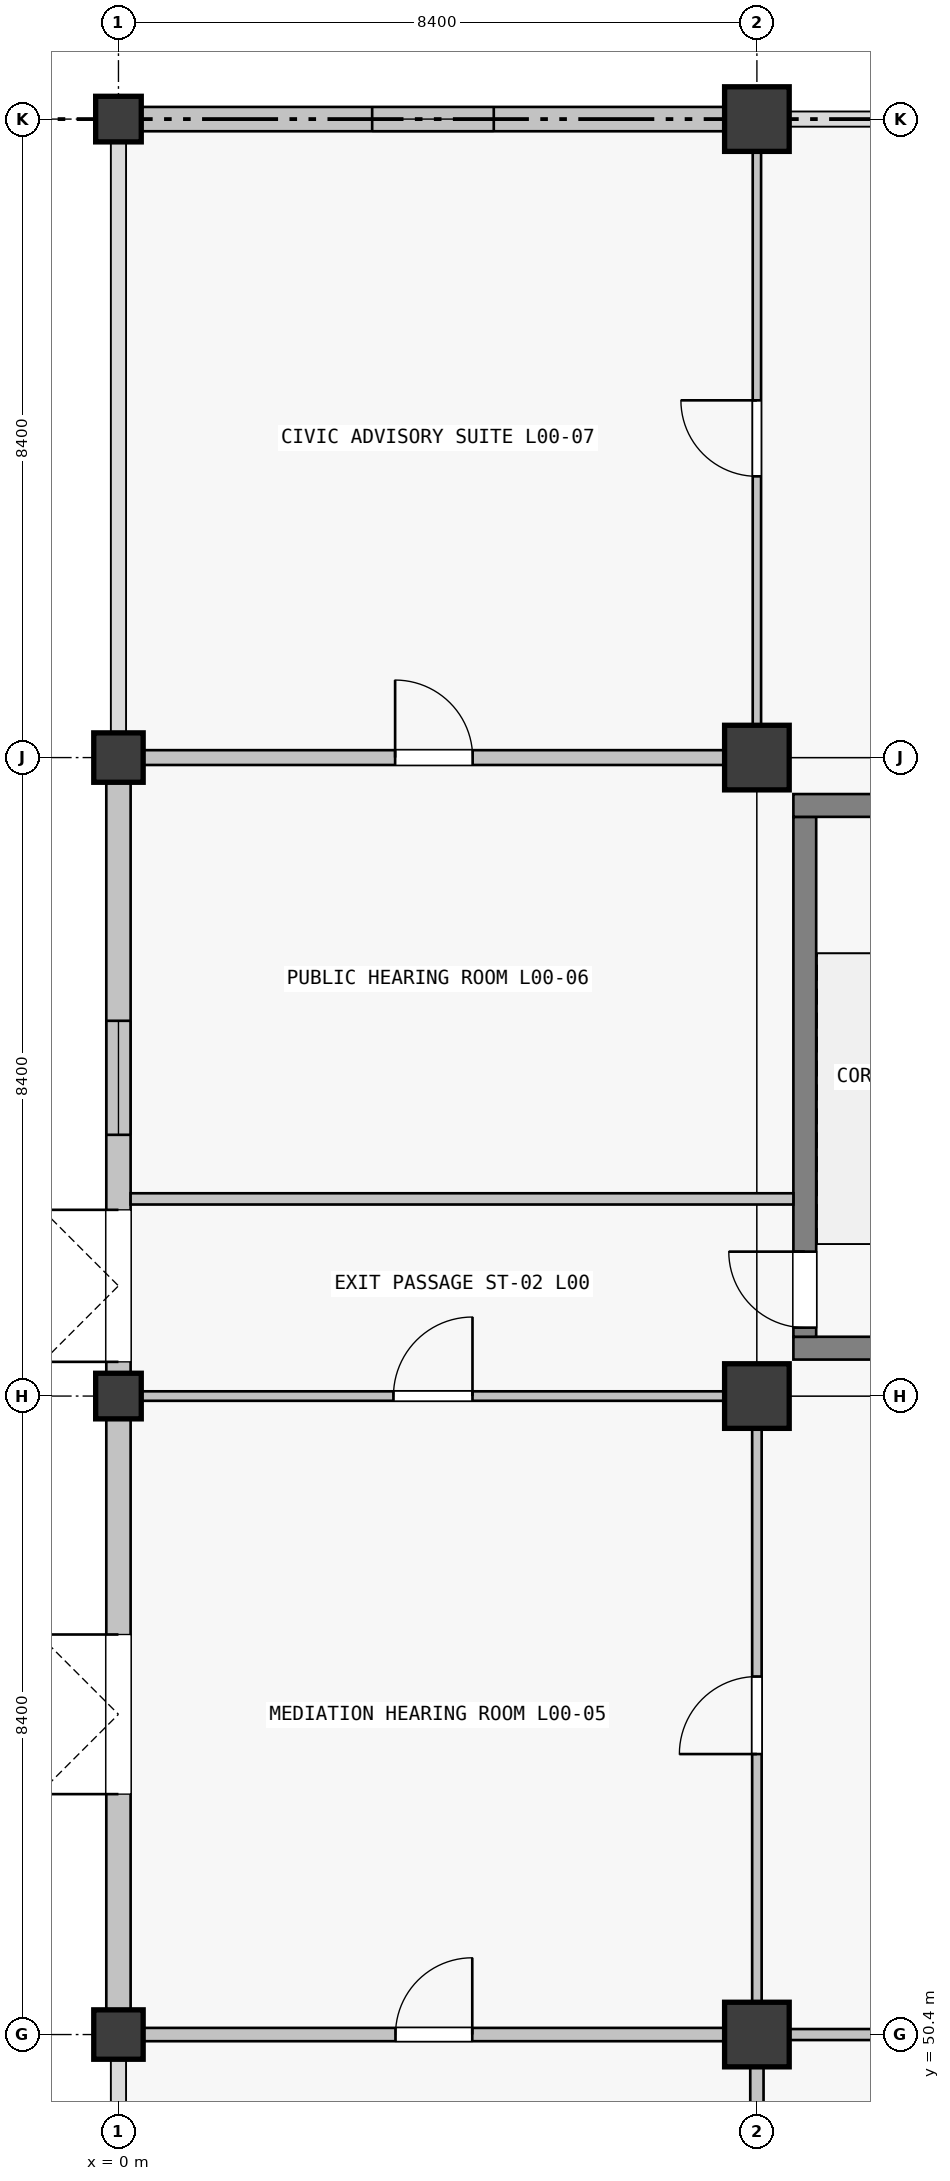
"""IFC4 building model, lengths in metres.
Left out: names, types, materials, properties, quantities, classifications, styles, units other than length and angle.
Written with IfcOpenShell. Run it as: python <this file> out.ifc"""

import sys

from ifc_helpers import new_model, si_unit, direction, frame, frame_2d, origin, origin_2d, place, context, subcontext, project, spatial, rectangle, extrude, element, fill, save


model = new_model("IFC4")
c1 = context("Model", 3, precision=1e-05, world=origin(), true_north=direction((0.0, 1.0)))
c2 = subcontext(c1, "Body", "Model", "MODEL_VIEW")
j1 = project(units=[si_unit("LENGTHUNIT", "METRE"), si_unit("PLANEANGLEUNIT", "RADIAN")], contexts=[c1])
p1 = place(None, origin())
s1 = spatial("IfcSite", under=j1, at=p1, CompositionType="ELEMENT")
p2 = place(p1, origin())
s2 = spatial("IfcBuilding", under=s1, at=p2, CompositionType="ELEMENT")
p3 = place(p2, origin())
s3 = spatial("IfcBuildingStorey", under=s2, at=p3, CompositionType="ELEMENT", Elevation=0.0)
p4 = place(p3, frame((0.0, 50.4, 0.0), z_axis=(0.0, 0.0, 1.0), x_axis=(1.0, 0.0, 0.0)))
e1 = element("IfcColumn", 1, at=p4, inside=s3, PredefinedType="COLUMN", context=c2, shape_type="SweptSolid", body=[
    extrude(rectangle(XDim=0.65, YDim=0.65, at=origin_2d()), origin(), (0.0, 0.0, 1.0), 5.76),
])
p5 = place(p3, frame((0.0, 58.8, 0.0), z_axis=(0.0, 0.0, 1.0), x_axis=(1.0, 0.0, 0.0)))
e2 = element("IfcColumn", 2, at=p5, inside=s3, PredefinedType="COLUMN", context=c2, shape_type="SweptSolid", body=[
    extrude(rectangle(XDim=0.6, YDim=0.6, at=origin_2d()), origin(), (0.0, 0.0, 1.0), 5.76),
])
p6 = place(p3, frame((0.0, 67.2, 0.0), z_axis=(0.0, 0.0, 1.0), x_axis=(1.0, 0.0, 0.0)))
e3 = element("IfcColumn", 3, at=p6, inside=s3, PredefinedType="COLUMN", context=c2, shape_type="SweptSolid", body=[
    extrude(rectangle(XDim=0.65, YDim=0.65, at=origin_2d()), origin(), (0.0, 0.0, 1.0), 5.76),
])
p7 = place(p3, frame((0.0, 75.6, 0.0), z_axis=(0.0, 0.0, 1.0), x_axis=(1.0, 0.0, 0.0)))
e4 = element("IfcColumn", 4, at=p7, inside=s3, PredefinedType="COLUMN", context=c2, shape_type="SweptSolid", body=[
    extrude(rectangle(XDim=0.6, YDim=0.6, at=origin_2d()), origin(), (0.0, 0.0, 1.0), 5.76),
])
for number, where, z_axis, x_axis in (
    (5, (8.4, 50.4, 0.0), (0.0, 0.0, 1.0), (1.0, 0.0, 0.0)),
    (6, (8.4, 58.8, 0.0), (0.0, 0.0, 1.0), (1.0, 0.0, 0.0)),
    (7, (8.4, 67.2, 0.0), (0.0, 0.0, 1.0), (1.0, 0.0, 0.0)),
    (8, (8.4, 75.6, 0.0), (0.0, 0.0, 1.0), (1.0, 0.0, 0.0)),
):
    element("IfcColumn", number, at=place(p3, frame(where, z_axis=z_axis, x_axis=x_axis)), inside=s3, PredefinedType="COLUMN", context=c2, shape_type="SweptSolid", body=[
        extrude(rectangle(XDim=0.85, YDim=0.85, at=origin_2d()), origin(), (0.0, 0.0, 1.0), 5.76),
    ])
p8 = place(p3, frame((0.0, 50.726, 0.0), z_axis=(0.0, 0.0, 1.0), x_axis=(0.0, 1.0, 0.0)))
e9 = element("IfcWall", 9, at=p8, inside=s3, PredefinedType="SOLIDWALL", context=c2, shape_type="SweptSolid", body=[
    extrude(rectangle(XDim=7.773, YDim=0.32, at=frame_2d((3.886, 0.0))), origin(), (0.0, 0.0, 1.0), 4.7),
])
p9 = place(p8, frame((2.837, 0.0, 0.0)))
e10 = element("IfcOpeningElement", 10, at=p9, cuts=e9, PredefinedType="OPENING", context=c2, shape_type="SweptSolid", body=[
    extrude(rectangle(XDim=2.1, YDim=2.25, at=frame_2d((1.05, 1.125))), frame((0.0, 0.16, 0.0), z_axis=(0.0, -1.0, 0.0), x_axis=(1.0, 0.0, 0.0)), (0.0, 0.0, 1.0), 0.32),
])
p10 = place(p3, frame((0.0, 59.101, 0.0), z_axis=(0.0, 0.0, 1.0), x_axis=(0.0, 1.0, 0.0)))
e11 = element("IfcWall", 11, at=p10, inside=s3, PredefinedType="SOLIDWALL", context=c2, shape_type="SweptSolid", body=[
    extrude(rectangle(XDim=7.773, YDim=0.32, at=frame_2d((3.886, 0.0))), origin(), (0.0, 0.0, 1.0), 4.7),
])
p11 = place(p10, frame((3.136, 0.0, 0.9)))
e12 = element("IfcOpeningElement", 12, at=p11, cuts=e11, PredefinedType="OPENING", context=c2, shape_type="SweptSolid", body=[
    extrude(rectangle(XDim=1.5, YDim=1.8, at=frame_2d((0.75, 0.9))), frame((0.0, 0.16, 0.0), z_axis=(0.0, -1.0, 0.0), x_axis=(1.0, 0.0, 0.0)), (0.0, 0.0, 1.0), 0.32),
])
p12 = place(p10, frame((0.149, 0.0, 0.0)))
e13 = element("IfcOpeningElement", 13, at=p12, cuts=e11, PredefinedType="OPENING", context=c2, shape_type="SweptSolid", body=[
    extrude(rectangle(XDim=2.0, YDim=2.25, at=frame_2d((1.0, 1.125))), frame((0.0, 0.16, 0.0), z_axis=(0.0, -1.0, 0.0), x_axis=(1.0, 0.0, 0.0)), (0.0, 0.0, 1.0), 0.32),
])
p13 = place(p3, frame((0.301, 75.6, 0.0), z_axis=(0.0, 0.0, 1.0), x_axis=(1.0, 0.0, 0.0)))
e14 = element("IfcWall", 14, at=p13, inside=s3, PredefinedType="SOLIDWALL", context=c2, shape_type="SweptSolid", body=[
    extrude(rectangle(XDim=7.673, YDim=0.32, at=frame_2d((3.836, 0.0))), origin(), (0.0, 0.0, 1.0), 4.7),
])
p14 = place(p13, frame((3.037, 0.0, 0.9)))
e15 = element("IfcOpeningElement", 15, at=p14, cuts=e14, PredefinedType="OPENING", context=c2, shape_type="SweptSolid", body=[
    extrude(rectangle(XDim=1.6, YDim=2.1, at=frame_2d((0.8, 1.05))), frame((0.0, 0.16, 0.0), z_axis=(0.0, -1.0, 0.0), x_axis=(1.0, 0.0, 0.0)), (0.0, 0.0, 1.0), 0.32),
])
p15 = place(p3, frame((16.32, 59.43, 0.0), z_axis=(0.0, 0.0, 1.0), x_axis=(-1.0, 0.0, 0.0)))
e16 = element("IfcWall", 16, at=p15, inside=s3, PredefinedType="SHEAR", context=c2, shape_type="SweptSolid", body=[
    extrude(rectangle(XDim=7.44, YDim=0.3, at=frame_2d((3.72, 0.0))), origin(), (0.0, 0.0, 1.0), 5.76),
])
p16 = place(p15, frame((1.28, 0.0, 0.0)))
e17 = element("IfcOpeningElement", 17, at=p16, cuts=e16, PredefinedType="OPENING", context=c2, shape_type="SweptSolid", body=[
    extrude(rectangle(XDim=1.5, YDim=2.15, at=frame_2d((0.75, 1.075))), frame((0.0, 0.15, 0.0), z_axis=(0.0, -1.0, 0.0), x_axis=(1.0, 0.0, 0.0)), (0.0, 0.0, 1.0), 0.3),
])
p17 = place(p3, frame((9.03, 59.58, 0.0), z_axis=(0.0, 0.0, 1.0), x_axis=(0.0, 1.0, 0.0)))
e18 = element("IfcWall", 18, at=p17, inside=s3, PredefinedType="SHEAR", context=c2, shape_type="SweptSolid", body=[
    extrude(rectangle(XDim=6.84, YDim=0.3, at=frame_2d((3.42, 0.0))), origin(), (0.0, 0.0, 1.0), 5.76),
])
p18 = place(p17, frame((0.12, 0.0, 0.0)))
e19 = element("IfcOpeningElement", 19, at=p18, cuts=e18, PredefinedType="OPENING", context=c2, shape_type="SweptSolid", body=[
    extrude(rectangle(XDim=1.0, YDim=2.15, at=frame_2d((0.5, 1.075))), frame((0.0, 0.15, 0.0), z_axis=(0.0, -1.0, 0.0), x_axis=(1.0, 0.0, 0.0)), (0.0, 0.0, 1.0), 0.3),
])
p19 = place(p3, frame((8.88, 66.57, 0.0), z_axis=(0.0, 0.0, 1.0), x_axis=(1.0, 0.0, 0.0)))
e20 = element("IfcWall", 20, at=p19, inside=s3, PredefinedType="SHEAR", context=c2, shape_type="SweptSolid", body=[
    extrude(rectangle(XDim=7.44, YDim=0.3, at=frame_2d((3.72, 0.0))), origin(), (0.0, 0.0, 1.0), 5.76),
])
p20 = place(p3, frame((0.327, 50.4, 0.0), z_axis=(0.0, 0.0, 1.0), x_axis=(1.0, 0.0, 0.0)))
e21 = element("IfcWall", 21, at=p20, inside=s3, PredefinedType="PARTITIONING", context=c2, shape_type="SweptSolid", body=[
    extrude(rectangle(XDim=7.646, YDim=0.175, at=frame_2d((3.823, 0.0))), origin(), (0.0, 0.0, 1.0), 3.66),
])
p21 = place(p20, frame((3.318, 0.0, 0.0)))
e22 = element("IfcOpeningElement", 22, at=p21, cuts=e21, PredefinedType="OPENING", context=c2, shape_type="SweptSolid", body=[
    extrude(rectangle(XDim=1.01, YDim=2.12, at=frame_2d((0.505, 1.06))), frame((0.0, 0.087, 0.0), z_axis=(0.0, -1.0, 0.0), x_axis=(1.0, 0.0, 0.0)), (0.0, 0.0, 1.0), 0.175),
])
p22 = place(p3, frame((0.302, 58.8, 0.0), z_axis=(0.0, 0.0, 1.0), x_axis=(1.0, 0.0, 0.0)))
e23 = element("IfcWall", 23, at=p22, inside=s3, PredefinedType="PARTITIONING", context=c2, shape_type="SweptSolid", body=[
    extrude(rectangle(XDim=7.671, YDim=0.125, at=frame_2d((3.835, 0.0))), origin(), (0.0, 0.0, 1.0), 3.66),
])
p23 = place(p22, frame((3.316, 0.0, 0.0)))
e24 = element("IfcOpeningElement", 24, at=p23, cuts=e23, PredefinedType="OPENING", context=c2, shape_type="SweptSolid", body=[
    extrude(rectangle(XDim=1.04, YDim=2.2, at=frame_2d((0.52, 1.1))), frame((0.0, 0.062, 0.0), z_axis=(0.0, -1.0, 0.0), x_axis=(1.0, 0.0, 0.0)), (0.0, 0.0, 1.0), 0.125),
])
p24 = place(p3, frame((0.327, 67.2, 0.0), z_axis=(0.0, 0.0, 1.0), x_axis=(1.0, 0.0, 0.0)))
e25 = element("IfcWall", 25, at=p24, inside=s3, PredefinedType="PARTITIONING", context=c2, shape_type="SweptSolid", body=[
    extrude(rectangle(XDim=7.646, YDim=0.195, at=frame_2d((3.823, 0.0))), origin(), (0.0, 0.0, 1.0), 3.66),
])
p25 = place(p24, frame((3.313, 0.0, 0.0)))
e26 = element("IfcOpeningElement", 26, at=p25, cuts=e25, PredefinedType="OPENING", context=c2, shape_type="SweptSolid", body=[
    extrude(rectangle(XDim=1.02, YDim=2.2, at=frame_2d((0.51, 1.1))), frame((0.0, 0.098, 0.0), z_axis=(0.0, -1.0, 0.0), x_axis=(1.0, 0.0, 0.0)), (0.0, 0.0, 1.0), 0.195),
])
p26 = place(p3, frame((8.827, 50.4, 0.0), z_axis=(0.0, 0.0, 1.0), x_axis=(1.0, 0.0, 0.0)))
e27 = element("IfcWall", 27, at=p26, inside=s3, PredefinedType="PARTITIONING", context=c2, shape_type="SweptSolid", body=[
    extrude(rectangle(XDim=7.546, YDim=0.145, at=frame_2d((3.773, 0.0))), origin(), (0.0, 0.0, 1.0), 3.66),
])
p27 = place(p26, frame((3.263, 0.0, 0.0)))
e28 = element("IfcOpeningElement", 28, at=p27, cuts=e27, PredefinedType="OPENING", context=c2, shape_type="SweptSolid", body=[
    extrude(rectangle(XDim=1.02, YDim=2.2, at=frame_2d((0.51, 1.1))), frame((0.0, 0.073, 0.0), z_axis=(0.0, -1.0, 0.0), x_axis=(1.0, 0.0, 0.0)), (0.0, 0.0, 1.0), 0.145),
])
p28 = place(p3, frame((8.4, 42.427, 0.0), z_axis=(0.0, 0.0, 1.0), x_axis=(0.0, 1.0, 0.0)))
e29 = element("IfcWall", 29, at=p28, inside=s3, PredefinedType="PARTITIONING", context=c2, shape_type="SweptSolid", body=[
    extrude(rectangle(XDim=7.546, YDim=0.175, at=frame_2d((3.773, 0.0))), origin(), (0.0, 0.0, 1.0), 3.66),
])
p29 = place(p28, frame((3.303, 0.0, 0.0)))
e30 = element("IfcOpeningElement", 30, at=p29, cuts=e29, PredefinedType="OPENING", context=c2, shape_type="SweptSolid", body=[
    extrude(rectangle(XDim=0.94, YDim=2.15, at=frame_2d((0.47, 1.075))), frame((0.0, 0.087, 0.0), z_axis=(0.0, -1.0, 0.0), x_axis=(1.0, 0.0, 0.0)), (0.0, 0.0, 1.0), 0.175),
])
p30 = place(p3, frame((8.4, 50.827, 0.0), z_axis=(0.0, 0.0, 1.0), x_axis=(0.0, 1.0, 0.0)))
e31 = element("IfcWall", 31, at=p30, inside=s3, PredefinedType="PARTITIONING", context=c2, shape_type="SweptSolid", body=[
    extrude(rectangle(XDim=7.546, YDim=0.125, at=frame_2d((3.773, 0.0))), origin(), (0.0, 0.0, 1.0), 3.66),
])
p31 = place(p30, frame((3.263, 0.0, 0.0)))
e32 = element("IfcOpeningElement", 32, at=p31, cuts=e31, PredefinedType="OPENING", context=c2, shape_type="SweptSolid", body=[
    extrude(rectangle(XDim=1.02, YDim=2.2, at=frame_2d((0.51, 1.1))), frame((0.0, 0.062, 0.0), z_axis=(0.0, -1.0, 0.0), x_axis=(1.0, 0.0, 0.0)), (0.0, 0.0, 1.0), 0.125),
])
p32 = place(p3, frame((8.4, 67.627, 0.0), z_axis=(0.0, 0.0, 1.0), x_axis=(0.0, 1.0, 0.0)))
e33 = element("IfcWall", 33, at=p32, inside=s3, PredefinedType="MOVABLE", context=c2, shape_type="SweptSolid", body=[
    extrude(rectangle(XDim=7.546, YDim=0.11, at=frame_2d((3.773, 0.0))), origin(), (0.0, 0.0, 1.0), 3.66),
])
p33 = place(p32, frame((3.273, 0.0, 0.0)))
e34 = element("IfcOpeningElement", 34, at=p33, cuts=e33, PredefinedType="OPENING", context=c2, shape_type="SweptSolid", body=[
    extrude(rectangle(XDim=1.0, YDim=2.2, at=frame_2d((0.5, 1.1))), frame((0.0, 0.055, 0.0), z_axis=(0.0, -1.0, 0.0), x_axis=(1.0, 0.0, 0.0)), (0.0, 0.0, 1.0), 0.11),
])
p34 = place(p3, frame((0.16, 61.394, 0.0), z_axis=(0.0, 0.0, 1.0), x_axis=(1.0, 0.0, 0.0)))
e35 = element("IfcWall", 35, at=p34, inside=s3, PredefinedType="PARTITIONING", context=c2, shape_type="SweptSolid", body=[
    extrude(rectangle(XDim=8.72, YDim=0.148, at=frame_2d((4.36, 0.0))), origin(), (0.0, 0.0, 1.0), 3.66),
])
p35 = place(p9, origin())
e36 = element("IfcDoor", 36, at=p35, inside=s3, OperationType="DOUBLE_DOOR_SINGLE_SWING", PredefinedType="DOOR", context=c2, shape_type="SweptSolid", body=[
    extrude(rectangle(XDim=2.1, YDim=2.25, at=frame_2d((1.05, 1.125))), frame((0.0, 0.025, 0.0), z_axis=(0.0, -1.0, 0.0), x_axis=(1.0, 0.0, 0.0)), (0.0, 0.0, 1.0), 0.05),
])
fill(e10, e36)
p36 = place(p11, origin())
e37 = element("IfcWindow", 37, at=p36, inside=s3, PartitioningType="SINGLE_PANEL", PredefinedType="WINDOW", context=c2, shape_type="SweptSolid", body=[
    extrude(rectangle(XDim=1.5, YDim=1.8, at=frame_2d((0.75, 0.9))), frame((0.0, 0.03, 0.0), z_axis=(0.0, -1.0, 0.0), x_axis=(1.0, 0.0, 0.0)), (0.0, 0.0, 1.0), 0.06),
])
fill(e12, e37)
p37 = place(p12, origin())
e38 = element("IfcDoor", 38, at=p37, inside=s3, OperationType="DOUBLE_DOOR_SINGLE_SWING", PredefinedType="DOOR", context=c2, shape_type="SweptSolid", body=[
    extrude(rectangle(XDim=2.0, YDim=2.25, at=frame_2d((1.0, 1.125))), frame((0.0, 0.025, 0.0), z_axis=(0.0, -1.0, 0.0), x_axis=(1.0, 0.0, 0.0)), (0.0, 0.0, 1.0), 0.05),
])
fill(e13, e38)
p38 = place(p14, origin())
e39 = element("IfcWindow", 39, at=p38, inside=s3, PartitioningType="SINGLE_PANEL", PredefinedType="WINDOW", context=c2, shape_type="SweptSolid", body=[
    extrude(rectangle(XDim=1.6, YDim=2.1, at=frame_2d((0.8, 1.05))), frame((0.0, 0.03, 0.0), z_axis=(0.0, -1.0, 0.0), x_axis=(1.0, 0.0, 0.0)), (0.0, 0.0, 1.0), 0.06),
])
fill(e15, e39)
p39 = place(p18, origin())
e40 = element("IfcDoor", 40, at=p39, inside=s3, OperationType="SINGLE_SWING_RIGHT", PredefinedType="DOOR", context=c2, shape_type="SweptSolid", body=[
    extrude(rectangle(XDim=1.0, YDim=2.15, at=frame_2d((0.5, 1.075))), frame((0.0, 0.025, 0.0), z_axis=(0.0, -1.0, 0.0), x_axis=(1.0, 0.0, 0.0)), (0.0, 0.0, 1.0), 0.05),
])
fill(e19, e40)
p40 = place(p31, origin())
e41 = element("IfcDoor", 41, at=p40, inside=s3, OperationType="SINGLE_SWING_LEFT", PredefinedType="DOOR", context=c2, shape_type="SweptSolid", body=[
    extrude(rectangle(XDim=1.02, YDim=2.2, at=frame_2d((0.51, 1.1))), frame((0.0, 0.025, 0.0), z_axis=(0.0, -1.0, 0.0), x_axis=(1.0, 0.0, 0.0)), (0.0, 0.0, 1.0), 0.05),
])
fill(e32, e41)
p41 = place(p23, origin())
e42 = element("IfcDoor", 42, at=p41, inside=s3, OperationType="SINGLE_SWING_RIGHT", PredefinedType="DOOR", context=c2, shape_type="SweptSolid", body=[
    extrude(rectangle(XDim=1.04, YDim=2.2, at=frame_2d((0.52, 1.1))), frame((0.0, 0.025, 0.0), z_axis=(0.0, -1.0, 0.0), x_axis=(1.0, 0.0, 0.0)), (0.0, 0.0, 1.0), 0.05),
])
fill(e24, e42)
p42 = place(p25, origin())
e43 = element("IfcDoor", 43, at=p42, inside=s3, OperationType="SINGLE_SWING_LEFT", PredefinedType="DOOR", context=c2, shape_type="SweptSolid", body=[
    extrude(rectangle(XDim=1.02, YDim=2.2, at=frame_2d((0.51, 1.1))), frame((0.0, 0.025, 0.0), z_axis=(0.0, -1.0, 0.0), x_axis=(1.0, 0.0, 0.0)), (0.0, 0.0, 1.0), 0.05),
])
fill(e26, e43)
p43 = place(p33, origin())
e44 = element("IfcDoor", 44, at=p43, inside=s3, OperationType="SINGLE_SWING_RIGHT", PredefinedType="DOOR", context=c2, shape_type="SweptSolid", body=[
    extrude(rectangle(XDim=1.0, YDim=2.2, at=frame_2d((0.5, 1.1))), frame((0.0, 0.025, 0.0), z_axis=(0.0, -1.0, 0.0), x_axis=(1.0, 0.0, 0.0)), (0.0, 0.0, 1.0), 0.05),
])
fill(e34, e44)
p44 = place(p21, origin())
e45 = element("IfcDoor", 45, at=p44, inside=s3, OperationType="SINGLE_SWING_RIGHT", PredefinedType="DOOR", context=c2, shape_type="SweptSolid", body=[
    extrude(rectangle(XDim=1.01, YDim=2.12, at=frame_2d((0.505, 1.06))), frame((0.0, 0.025, 0.0), z_axis=(0.0, -1.0, 0.0), x_axis=(1.0, 0.0, 0.0)), (0.0, 0.0, 1.0), 0.05),
])
fill(e22, e45)
save(model, sys.argv[1])
